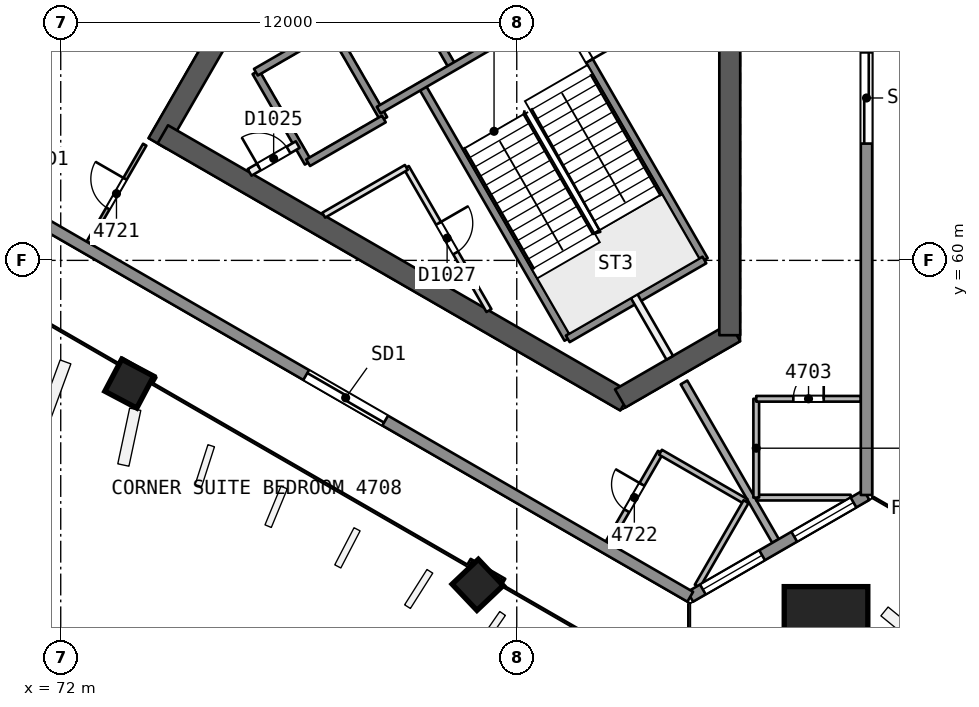
"""IFC4 building model, lengths in metres.
Left out: names, types, materials, properties, quantities, classifications, styles, units other than length and angle.
Written with IfcOpenShell. Run it as: python <this file> out.ifc"""

import sys

from ifc_helpers import new_model, si_unit, direction, frame, frame_2d, origin, origin_2d, place, context, subcontext, project, spatial, rectangle, extrude, element, fill, save


model = new_model("IFC4")
c1 = context("Model", 3, precision=1e-05, world=origin(), true_north=direction((0.0, 1.0)))
c2 = subcontext(c1, "Body", "Model", "MODEL_VIEW")
j1 = project(units=[si_unit("LENGTHUNIT", "METRE"), si_unit("PLANEANGLEUNIT", "RADIAN")], contexts=[c1])
p1 = place(None, origin())
s1 = spatial("IfcSite", under=j1, at=p1, CompositionType="ELEMENT")
p2 = place(p1, origin())
s2 = spatial("IfcBuilding", under=s1, at=p2, CompositionType="ELEMENT")
p3 = place(p2, frame((0.0, 0.0, 193.3)))
s3 = spatial("IfcBuildingStorey", under=s2, at=p3, CompositionType="ELEMENT", Elevation=193.3)
p4 = place(p3, frame((79.659, 71.931, 0.0), z_axis=(0.0, 0.0, 1.0), x_axis=(-0.500000202252, -0.866025287014, 0.0)))
e1 = element("IfcWall", 1, at=p4, inside=s3, PredefinedType="SHEAR", context=c2, shape_type="SweptSolid", body=[
    extrude(rectangle(XDim=10.221, YDim=0.55, at=frame_2d((5.111, 0.0))), origin(), (0.0, 0.0, 1.0), 3.7),
])
p5 = place(p4, frame((0.791, 0.0, 0.0)))
e2 = element("IfcOpeningElement", 2, at=p5, cuts=e1, PredefinedType="OPENING", context=c2, shape_type="SweptSolid", body=[
    extrude(rectangle(XDim=1.2, YDim=2.1, at=frame_2d((0.6, 1.05))), frame((0.0, 0.286, 0.0), z_axis=(0.0, -1.0, 0.0), x_axis=(1.0, 0.0, 0.0)), (0.0, 0.0, 1.0), 0.571),
])
p6 = place(p3, frame((74.686, 63.317, 0.0), z_axis=(0.0, 0.0, 1.0), x_axis=(0.866024505738, -0.500001555459, 0.0)))
e3 = element("IfcWall", 3, at=p6, inside=s3, PredefinedType="SHEAR", context=c2, shape_type="SweptSolid", body=[
    extrude(rectangle(XDim=14.059, YDim=0.55, at=frame_2d((7.029, 0.0))), origin(), (0.0, 0.0, 1.0), 3.7),
])
p7 = place(p3, frame((86.723, 56.367, 0.0), z_axis=(0.0, 0.0, 1.0), x_axis=(0.865997833373, 0.500047750313, 0.0)))
e4 = element("IfcWall", 4, at=p7, inside=s3, PredefinedType="SHEAR", context=c2, shape_type="SweptSolid", body=[
    extrude(rectangle(XDim=3.487, YDim=0.55, at=frame_2d((1.743, 0.0))), origin(), (0.0, 0.0, 1.0), 3.7),
])
p8 = place(p3, frame((89.605, 58.031, 0.0), z_axis=(0.0, 0.0, 1.0), x_axis=(0.0, 1.0, 0.0)))
e5 = element("IfcWall", 5, at=p8, inside=s3, PredefinedType="SHEAR", context=c2, shape_type="SweptSolid", body=[
    extrude(rectangle(XDim=14.175, YDim=0.55, at=frame_2d((7.087, 0.0))), origin(), (0.0, 0.0, 1.0), 3.7),
])
p9 = place(p3, frame((73.802, 56.728, 0.0), z_axis=(0.000857578916, 0.022824792675, 0.999739112668), x_axis=(-0.499949204908, -0.865819211891, 0.020196158824)))
e6 = element("IfcColumn", 6, at=p9, inside=s3, PredefinedType="COLUMN", context=c2, shape_type="SweptSolid", body=[
    extrude(rectangle(XDim=0.95, YDim=0.95, at=origin_2d()), origin(), (0.0, 0.0, 1.0), 3.701),
])
p10 = place(p3, frame((82.98, 51.429, 0.0), z_axis=(-0.008310502618, 0.028163369983, 0.999568787096), x_axis=(-0.502105222835, -0.864570935995, 0.020185188492)))
e7 = element("IfcColumn", 7, at=p10, inside=s3, PredefinedType="COLUMN", context=c2, shape_type="SweptSolid", body=[
    extrude(rectangle(XDim=0.95, YDim=0.95, at=origin_2d()), origin(), (0.0, 0.0, 1.0), 3.702),
])
p11 = place(p3, frame((92.159, 50.28, 0.0), z_axis=(-0.017607037296, 0.030466109479, 0.999380712447), x_axis=(-0.865809063816, -0.500374524745, 1.32655e-07)))
e8 = element("IfcColumn", 8, at=p11, inside=s3, PredefinedType="COLUMN", context=c2, shape_type="SweptSolid", body=[
    extrude(rectangle(XDim=2.2, YDim=2.2, at=origin_2d()), origin(), (0.0, 0.0, 1.0), 3.702),
])
p12 = place(p3, frame((92.786, 53.758, 0.0), z_axis=(0.0, 0.0, 1.0), x_axis=(-1.0, 0.0, 0.0)))
e9 = element("IfcWall", 9, at=p12, inside=s3, PredefinedType="PARTITIONING", context=c2, shape_type="SweptSolid", body=[
    extrude(rectangle(XDim=2.485, YDim=0.15, at=frame_2d((1.242, 0.0))), origin(), (0.0, 0.0, 1.0), 3.3),
])
p13 = place(p3, frame((90.302, 53.758, 0.0), z_axis=(0.0, 0.0, 1.0), x_axis=(0.0, 1.0, 0.0)))
e10 = element("IfcWall", 10, at=p13, inside=s3, PredefinedType="PARTITIONING", context=c2, shape_type="SweptSolid", body=[
    extrude(rectangle(XDim=2.6, YDim=0.15, at=frame_2d((1.3, 0.0))), origin(), (0.0, 0.0, 1.0), 3.3),
])
p14 = place(p3, frame((90.302, 56.358, 0.0), z_axis=(0.0, 0.0, 1.0), x_axis=(1.0, 0.0, 0.0)))
e11 = element("IfcWall", 11, at=p14, inside=s3, PredefinedType="PARTITIONING", context=c2, shape_type="SweptSolid", body=[
    extrude(rectangle(XDim=2.753, YDim=0.15, at=frame_2d((1.376, 0.0))), origin(), (0.0, 0.0, 1.0), 3.3),
])
p15 = place(p14, frame((0.976, 0.0, 0.0)))
e12 = element("IfcOpeningElement", 12, at=p15, cuts=e11, PredefinedType="OPENING", context=c2, shape_type="SweptSolid", body=[
    extrude(rectangle(XDim=0.8, YDim=2.1, at=frame_2d((0.4, 1.05))), frame((0.0, 0.085, 0.0), z_axis=(0.0, -1.0, 0.0), x_axis=(1.0, 0.0, 0.0)), (0.0, 0.0, 1.0), 0.171),
])
p16 = place(p3, frame((88.401, 56.789, 0.0), z_axis=(0.0, 0.0, 1.0), x_axis=(0.499971058166, -0.866042112715, 0.0)))
e13 = element("IfcWall", 13, at=p16, inside=s3, PredefinedType="PARTITIONING", context=c2, shape_type="SweptSolid", body=[
    extrude(rectangle(XDim=4.817, YDim=0.2, at=frame_2d((2.409, 0.0))), origin(), (0.0, 0.0, 1.0), 3.3),
])
p17 = place(p3, frame((68.673, 62.806, 0.0), z_axis=(0.0, 0.0, 1.0), x_axis=(0.499998338299, 0.866026363166, 0.0)))
e14 = element("IfcWall", 14, at=p17, inside=s3, PredefinedType="PARTITIONING", context=c2, shape_type="SweptSolid", body=[
    extrude(rectangle(XDim=10.954, YDim=0.2, at=frame_2d((5.477, 0.0))), origin(), (0.0, 0.0, 1.0), 3.3),
])
p18 = place(p3, frame((72.723, 60.468, 0.0), z_axis=(0.0, 0.0, 1.0), x_axis=(0.49997816789, 0.866038008192, 0.0)))
e15 = element("IfcWall", 15, at=p18, inside=s3, PredefinedType="PARTITIONING", context=c2, shape_type="SweptSolid", body=[
    extrude(rectangle(XDim=2.975, YDim=0.1, at=frame_2d((1.488, 0.0))), origin(), (0.0, 0.0, 1.0), 3.3),
])
p19 = place(p18, frame((1.038, 0.0, 0.0)))
e16 = element("IfcOpeningElement", 16, at=p19, cuts=e15, PredefinedType="OPENING", context=c2, shape_type="SweptSolid", body=[
    extrude(rectangle(XDim=0.9, YDim=2.1, at=frame_2d((0.45, 1.05))), frame((0.0, 0.061, 0.0), z_axis=(0.0, -1.0, 0.0), x_axis=(1.0, 0.0, 0.0)), (0.0, 0.0, 1.0), 0.121),
])
p20 = place(p3, frame((86.406, 52.568, 0.0), z_axis=(0.0, 0.0, 1.0), x_axis=(0.499983500429, 0.866034929606, 0.0)))
e17 = element("IfcWall", 17, at=p20, inside=s3, PredefinedType="PARTITIONING", context=c2, shape_type="SweptSolid", body=[
    extrude(rectangle(XDim=2.752, YDim=0.15, at=frame_2d((1.376, 0.0))), origin(), (0.0, 0.0, 1.0), 3.3),
])
p21 = place(p20, frame((0.976, 0.0, 0.0)))
e18 = element("IfcOpeningElement", 18, at=p21, cuts=e17, PredefinedType="OPENING", context=c2, shape_type="SweptSolid", body=[
    extrude(rectangle(XDim=0.8, YDim=2.1, at=frame_2d((0.4, 1.05))), frame((0.0, 0.085, 0.0), z_axis=(0.0, -1.0, 0.0), x_axis=(1.0, 0.0, 0.0)), (0.0, 0.0, 1.0), 0.171),
])
p22 = place(p3, frame((87.782, 54.951, 0.0), z_axis=(0.0, 0.0, 1.0), x_axis=(0.866021400173, -0.500006934395, 0.0)))
e19 = element("IfcWall", 19, at=p22, inside=s3, PredefinedType="PARTITIONING", context=c2, shape_type="SweptSolid", body=[
    extrude(rectangle(XDim=2.6, YDim=0.15, at=frame_2d((1.3, 0.0))), origin(), (0.0, 0.0, 1.0), 3.3),
])
p23 = place(p3, frame((90.034, 53.651, 0.0), z_axis=(0.0, 0.0, 1.0), x_axis=(-0.50000507078, -0.866022476149, 0.0)))
e20 = element("IfcWall", 20, at=p23, inside=s3, PredefinedType="PARTITIONING", context=c2, shape_type="SweptSolid", body=[
    extrude(rectangle(XDim=2.567, YDim=0.15, at=frame_2d((1.284, 0.0))), origin(), (0.0, 0.0, 1.0), 3.3),
])
p24 = place(p3, frame((93.203, 53.827, 0.0), z_axis=(0.0, 0.0, 1.0), x_axis=(-0.866023885066, -0.500002630489, 0.0)))
e21 = element("IfcWall", 21, at=p24, inside=s3, PredefinedType="SOLIDWALL", context=c2, shape_type="SweptSolid", body=[
    extrude(rectangle(XDim=5.355, YDim=0.3, at=frame_2d((2.678, 0.0))), origin(), (0.0, 0.0, 1.0), 3.3),
])
p25 = place(p24, frame((0.395, 0.0, 0.9)))
e22 = element("IfcOpeningElement", 22, at=p25, cuts=e21, PredefinedType="OPENING", context=c2, shape_type="SweptSolid", body=[
    extrude(rectangle(XDim=1.8, YDim=1.5, at=frame_2d((0.9, 0.75))), frame((0.0, 0.161, 0.0), z_axis=(0.0, -1.0, 0.0), x_axis=(1.0, 0.0, 0.0)), (0.0, 0.0, 1.0), 0.321),
])
p26 = place(p24, frame((3.172, 0.0, 0.9)))
e23 = element("IfcOpeningElement", 23, at=p26, cuts=e21, PredefinedType="OPENING", context=c2, shape_type="SweptSolid", body=[
    extrude(rectangle(XDim=1.8, YDim=1.5, at=frame_2d((0.9, 0.75))), frame((0.0, 0.161, 0.0), z_axis=(0.0, -1.0, 0.0), x_axis=(1.0, 0.0, 0.0)), (0.0, 0.0, 1.0), 0.321),
])
p27 = place(p3, frame((93.203, 106.173, 0.0), z_axis=(0.0, 0.0, 1.0), x_axis=(0.0, -1.0, 0.0)))
e24 = element("IfcWall", 24, at=p27, inside=s3, PredefinedType="SOLIDWALL", context=c2, shape_type="SweptSolid", body=[
    extrude(rectangle(XDim=52.347, YDim=0.3, at=frame_2d((26.173, 0.0))), origin(), (0.0, 0.0, 1.0), 3.3),
])
p28 = place(p27, frame((30.819, 0.0, 0.0)))
e25 = element("IfcOpeningElement", 25, at=p28, cuts=e24, PredefinedType="OPENING", context=c2, shape_type="SweptSolid", body=[
    extrude(rectangle(XDim=2.4, YDim=2.4, at=frame_2d((1.2, 1.2))), frame((0.0, 0.161, 0.0), z_axis=(0.0, -1.0, 0.0), x_axis=(1.0, 0.0, 0.0)), (0.0, 0.0, 1.0), 0.321),
])
p29 = place(p27, frame((40.7, 0.0, 0.0)))
e26 = element("IfcOpeningElement", 26, at=p29, cuts=e24, PredefinedType="OPENING", context=c2, shape_type="SweptSolid", body=[
    extrude(rectangle(XDim=2.4, YDim=2.4, at=frame_2d((1.2, 1.2))), frame((0.0, 0.161, 0.0), z_axis=(0.0, -1.0, 0.0), x_axis=(1.0, 0.0, 0.0)), (0.0, 0.0, 1.0), 0.321),
])
p30 = place(p27, frame((20.297, 0.0, 0.0)))
e27 = element("IfcOpeningElement", 27, at=p30, cuts=e24, PredefinedType="OPENING", context=c2, shape_type="SweptSolid", body=[
    extrude(rectangle(XDim=2.4, YDim=2.4, at=frame_2d((1.2, 1.2))), frame((0.0, 0.161, 0.0), z_axis=(0.0, -1.0, 0.0), x_axis=(1.0, 0.0, 0.0)), (0.0, 0.0, 1.0), 0.321),
])
p31 = place(p27, frame((9.27, 0.0, 0.0)))
e28 = element("IfcOpeningElement", 28, at=p31, cuts=e24, PredefinedType="OPENING", context=c2, shape_type="SweptSolid", body=[
    extrude(rectangle(XDim=2.4, YDim=2.4, at=frame_2d((1.2, 1.2))), frame((0.0, 0.161, 0.0), z_axis=(0.0, -1.0, 0.0), x_axis=(1.0, 0.0, 0.0)), (0.0, 0.0, 1.0), 0.321),
])
p32 = place(p27, frame((26.442, 0.0, 0.9)))
e29 = element("IfcOpeningElement", 29, at=p32, cuts=e24, PredefinedType="OPENING", context=c2, shape_type="SweptSolid", body=[
    extrude(rectangle(XDim=1.8, YDim=1.5, at=frame_2d((0.9, 0.75))), frame((0.0, 0.161, 0.0), z_axis=(0.0, -1.0, 0.0), x_axis=(1.0, 0.0, 0.0)), (0.0, 0.0, 1.0), 0.321),
])
p33 = place(p3, frame((88.565, 51.149, 0.0), z_axis=(0.0, 0.0, 1.0), x_axis=(-0.866025125259, 0.500000482419, 0.0)))
e30 = element("IfcWall", 30, at=p33, inside=s3, PredefinedType="SOLIDWALL", context=c2, shape_type="SweptSolid", body=[
    extrude(rectangle(XDim=52.347, YDim=0.3, at=frame_2d((26.173, 0.0))), origin(), (0.0, 0.0, 1.0), 3.3),
])
p34 = place(p33, frame((29.26, 0.0, 0.0)))
e31 = element("IfcOpeningElement", 31, at=p34, cuts=e30, PredefinedType="OPENING", context=c2, shape_type="SweptSolid", body=[
    extrude(rectangle(XDim=2.4, YDim=2.4, at=frame_2d((1.2, 1.2))), frame((0.0, 0.161, 0.0), z_axis=(0.0, -1.0, 0.0), x_axis=(1.0, 0.0, 0.0)), (0.0, 0.0, 1.0), 0.321),
])
p35 = place(p33, frame((40.7, 0.0, 0.0)))
e32 = element("IfcOpeningElement", 32, at=p35, cuts=e30, PredefinedType="OPENING", context=c2, shape_type="SweptSolid", body=[
    extrude(rectangle(XDim=2.4, YDim=2.4, at=frame_2d((1.2, 1.2))), frame((0.0, 0.161, 0.0), z_axis=(0.0, -1.0, 0.0), x_axis=(1.0, 0.0, 0.0)), (0.0, 0.0, 1.0), 0.321),
])
p36 = place(p33, frame((19.517, 0.0, 0.0)))
e33 = element("IfcOpeningElement", 33, at=p36, cuts=e30, PredefinedType="OPENING", context=c2, shape_type="SweptSolid", body=[
    extrude(rectangle(XDim=2.4, YDim=2.4, at=frame_2d((1.2, 1.2))), frame((0.0, 0.161, 0.0), z_axis=(0.0, -1.0, 0.0), x_axis=(1.0, 0.0, 0.0)), (0.0, 0.0, 1.0), 0.321),
])
p37 = place(p33, frame((9.27, 0.0, 0.0)))
e34 = element("IfcOpeningElement", 34, at=p37, cuts=e30, PredefinedType="OPENING", context=c2, shape_type="SweptSolid", body=[
    extrude(rectangle(XDim=2.4, YDim=2.4, at=frame_2d((1.2, 1.2))), frame((0.0, 0.161, 0.0), z_axis=(0.0, -1.0, 0.0), x_axis=(1.0, 0.0, 0.0)), (0.0, 0.0, 1.0), 0.321),
])
p38 = place(p33, frame((24.104, 0.0, 0.9)))
e35 = element("IfcOpeningElement", 35, at=p38, cuts=e30, PredefinedType="OPENING", context=c2, shape_type="SweptSolid", body=[
    extrude(rectangle(XDim=1.8, YDim=1.5, at=frame_2d((0.9, 0.75))), frame((0.0, 0.161, 0.0), z_axis=(0.0, -1.0, 0.0), x_axis=(1.0, 0.0, 0.0)), (0.0, 0.0, 1.0), 0.321),
])
p39 = place(p3, frame((77.135, 64.952, 0.0), z_axis=(0.0, 0.0, 1.0), x_axis=(0.499996545922, -0.866027397988, 0.0)))
e36 = element("IfcWall", 36, at=p39, inside=s3, PredefinedType="SOLIDWALL", context=c2, shape_type="SweptSolid", body=[
    extrude(rectangle(XDim=2.75, YDim=0.2, at=frame_2d((1.375, 0.0))), origin(), (0.0, 0.0, 1.0), 3.3),
])
p40 = place(p3, frame((81.094, 62.445, 0.0), z_axis=(0.0, 0.0, 1.0), x_axis=(0.499980071345, -0.866036909293, 0.0)))
e37 = element("IfcWall", 37, at=p40, inside=s3, PredefinedType="PARTITIONING", context=c2, shape_type="SweptSolid", body=[
    extrude(rectangle(XDim=4.348, YDim=0.15, at=frame_2d((2.174, 0.0))), origin(), (0.0, 0.0, 1.0), 3.3),
])
p41 = place(p40, frame((1.697, 0.0, 0.0)))
e38 = element("IfcOpeningElement", 38, at=p41, cuts=e37, PredefinedType="OPENING", context=c2, shape_type="SweptSolid", body=[
    extrude(rectangle(XDim=0.9, YDim=2.1, at=frame_2d((0.45, 1.05))), frame((0.0, 0.085, 0.0), z_axis=(0.0, -1.0, 0.0), x_axis=(1.0, 0.0, 0.0)), (0.0, 0.0, 1.0), 0.171),
])
p42 = place(p3, frame((79.127, 66.102, 0.0), z_axis=(0.0, 0.0, 1.0), x_axis=(0.499996545922, -0.866027397988, 0.0)))
e39 = element("IfcWall", 39, at=p42, inside=s3, PredefinedType="SOLIDWALL", context=c2, shape_type="SweptSolid", body=[
    extrude(rectangle(XDim=2.75, YDim=0.2, at=frame_2d((1.375, 0.0))), origin(), (0.0, 0.0, 1.0), 3.3),
])
p43 = place(p3, frame((81.493, 64.604, 0.0), z_axis=(0.0, 0.0, 1.0), x_axis=(0.500006057782, -0.866021906294, 0.0)))
e40 = element("IfcWall", 40, at=p43, inside=s3, PredefinedType="SOLIDWALL", context=c2, shape_type="SweptSolid", body=[
    extrude(rectangle(XDim=7.7, YDim=0.2, at=frame_2d((3.85, 0.0))), origin(), (0.0, 0.0, 1.0), 3.3),
])
p44 = place(p3, frame((81.076, 67.227, 0.0), z_axis=(0.0, 0.0, 1.0), x_axis=(0.50000366821, -0.866023285932, 0.0)))
e41 = element("IfcWall", 41, at=p44, inside=s3, PredefinedType="SOLIDWALL", context=c2, shape_type="SweptSolid", body=[
    extrude(rectangle(XDim=2.48, YDim=0.2, at=frame_2d((1.24, 0.0))), origin(), (0.0, 0.0, 1.0), 3.3),
])
p45 = place(p3, frame((87.09, 59.06, 0.0), z_axis=(0.0, 0.0, 1.0), x_axis=(0.499951854219, -0.86605319898, 0.0)))
e42 = element("IfcWall", 42, at=p45, inside=s3, PredefinedType="PARTITIONING", context=c2, shape_type="SweptSolid", body=[
    extrude(rectangle(XDim=1.873, YDim=0.2, at=frame_2d((0.937, 0.0))), origin(), (0.0, 0.0, 1.0), 3.3),
])
p46 = place(p3, frame((85.087, 66.679, 0.0), z_axis=(0.0, 0.0, 1.0), x_axis=(0.500019787375, -0.866013979237, 0.0)))
e43 = element("IfcWall", 43, at=p46, inside=s3, PredefinedType="SOLIDWALL", context=c2, shape_type="SweptSolid", body=[
    extrude(rectangle(XDim=7.7, YDim=0.2, at=frame_2d((3.85, 0.0))), origin(), (0.0, 0.0, 1.0), 3.3),
])
p47 = place(p46, frame((0.55, 0.0, 0.0)))
e44 = element("IfcOpeningElement", 44, at=p47, cuts=e43, PredefinedType="OPENING", context=c2, shape_type="SweptSolid", body=[
    extrude(rectangle(XDim=1.1, YDim=2.1, at=frame_2d((0.55, 1.05))), frame((0.0, 0.11, 0.0), z_axis=(0.0, -1.0, 0.0), x_axis=(1.0, 0.0, 0.0)), (0.0, 0.0, 1.0), 0.221),
])
p48 = place(p3, frame((77.135, 64.952, 0.0), z_axis=(0.0, 0.0, 1.0), x_axis=(0.866031916153, 0.499988720078, 0.0)))
e45 = element("IfcWall", 45, at=p48, inside=s3, PredefinedType="SOLIDWALL", context=c2, shape_type="SweptSolid", body=[
    extrude(rectangle(XDim=11.35, YDim=0.2, at=frame_2d((5.675, 0.0))), origin(), (0.0, 0.0, 1.0), 3.3),
])
p49 = place(p3, frame((76.97, 62.316, 0.0), z_axis=(0.0, 0.0, 1.0), x_axis=(0.865982457891, 0.500074377092, 0.0)))
e46 = element("IfcWall", 46, at=p49, inside=s3, PredefinedType="PARTITIONING", context=c2, shape_type="SweptSolid", body=[
    extrude(rectangle(XDim=1.461, YDim=0.2, at=frame_2d((0.73, 0.0))), origin(), (0.0, 0.0, 1.0), 3.3),
])
p50 = place(p49, frame((0.281, 0.0, 0.0)))
e47 = element("IfcOpeningElement", 47, at=p50, cuts=e46, PredefinedType="OPENING", context=c2, shape_type="SweptSolid", body=[
    extrude(rectangle(XDim=0.9, YDim=2.1, at=frame_2d((0.45, 1.05))), frame((0.0, 0.11, 0.0), z_axis=(0.0, -1.0, 0.0), x_axis=(1.0, 0.0, 0.0)), (0.0, 0.0, 1.0), 0.221),
])
p51 = place(p3, frame((80.367, 63.954, 0.0), z_axis=(0.0, 0.0, 1.0), x_axis=(0.866026575979, 0.499997969693, 0.0)))
e48 = element("IfcWall", 48, at=p51, inside=s3, PredefinedType="SOLIDWALL", context=c2, shape_type="SweptSolid", body=[
    extrude(rectangle(XDim=6.75, YDim=0.2, at=frame_2d((3.375, 0.0))), origin(), (0.0, 0.0, 1.0), 3.3),
])
p52 = place(p3, frame((78.51, 62.57, 0.0), z_axis=(0.0, 0.0, 1.0), x_axis=(0.866053019151, 0.499952165731, 0.0)))
e49 = element("IfcWall", 49, at=p52, inside=s3, PredefinedType="SOLIDWALL", context=c2, shape_type="SweptSolid", body=[
    extrude(rectangle(XDim=2.3, YDim=0.2, at=frame_2d((1.15, 0.0))), origin(), (0.0, 0.0, 1.0), 3.3),
])
p53 = place(p3, frame((78.92, 61.19, 0.0), z_axis=(0.0, 0.0, 1.0), x_axis=(0.866038211682, 0.499977815414, 0.0)))
e50 = element("IfcWall", 50, at=p53, inside=s3, PredefinedType="PARTITIONING", context=c2, shape_type="SweptSolid", body=[
    extrude(rectangle(XDim=2.51, YDim=0.15, at=frame_2d((1.255, 0.0))), origin(), (0.0, 0.0, 1.0), 3.3),
])
p54 = place(p3, frame((85.343, 57.935, 0.0), z_axis=(0.0, 0.0, 1.0), x_axis=(0.866004344652, 0.500036473714, 0.0)))
e51 = element("IfcWall", 51, at=p54, inside=s3, PredefinedType="SOLIDWALL", context=c2, shape_type="SweptSolid", body=[
    extrude(rectangle(XDim=4.15, YDim=0.2, at=frame_2d((2.075, 0.0))), origin(), (0.0, 0.0, 1.0), 3.3),
])
p55 = place(p15, origin())
e52 = element("IfcDoor", 52, at=p55, inside=s3, OperationType="SINGLE_SWING_RIGHT", PredefinedType="NOTDEFINED", context=c2, shape_type="SweptSolid", body=[
    extrude(rectangle(XDim=0.8, YDim=2.1, at=frame_2d((0.4, 1.05))), frame((0.0, 0.025, 0.0), z_axis=(0.0, -1.0, 0.0), x_axis=(1.0, 0.0, 0.0)), (0.0, 0.0, 1.0), 0.05),
])
fill(e12, e52)
p56 = place(p19, origin())
e53 = element("IfcDoor", 53, at=p56, inside=s3, OperationType="SINGLE_SWING_RIGHT", PredefinedType="NOTDEFINED", context=c2, shape_type="SweptSolid", body=[
    extrude(rectangle(XDim=0.9, YDim=2.1, at=frame_2d((0.45, 1.05))), frame((0.0, 0.025, 0.0), z_axis=(0.0, -1.0, 0.0), x_axis=(1.0, 0.0, 0.0)), (0.0, 0.0, 1.0), 0.05),
])
fill(e16, e53)
p57 = place(p21, origin())
e54 = element("IfcDoor", 54, at=p57, inside=s3, OperationType="SINGLE_SWING_RIGHT", PredefinedType="NOTDEFINED", context=c2, shape_type="SweptSolid", body=[
    extrude(rectangle(XDim=0.8, YDim=2.1, at=frame_2d((0.4, 1.05))), frame((0.0, 0.025, 0.0), z_axis=(0.0, -1.0, 0.0), x_axis=(1.0, 0.0, 0.0)), (0.0, 0.0, 1.0), 0.05),
])
fill(e18, e54)
p58 = place(p25, origin())
e55 = element("IfcWindow", 55, at=p58, inside=s3, PartitioningType="SINGLE_PANEL", PredefinedType="WINDOW", context=c2, shape_type="SweptSolid", body=[
    extrude(rectangle(XDim=1.8, YDim=1.5, at=frame_2d((0.9, 0.75))), frame((0.0, 0.03, 0.0), z_axis=(0.0, -1.0, 0.0), x_axis=(1.0, 0.0, 0.0)), (0.0, 0.0, 1.0), 0.06),
])
fill(e22, e55)
p59 = place(p26, origin())
e56 = element("IfcWindow", 56, at=p59, inside=s3, PartitioningType="SINGLE_PANEL", PredefinedType="WINDOW", context=c2, shape_type="SweptSolid", body=[
    extrude(rectangle(XDim=1.8, YDim=1.5, at=frame_2d((0.9, 0.75))), frame((0.0, 0.03, 0.0), z_axis=(0.0, -1.0, 0.0), x_axis=(1.0, 0.0, 0.0)), (0.0, 0.0, 1.0), 0.06),
])
fill(e23, e56)
p60 = place(p29, origin())
e57 = element("IfcDoor", 57, at=p60, inside=s3, OperationType="SLIDING_TO_RIGHT", PredefinedType="NOTDEFINED", context=c2, shape_type="SweptSolid", body=[
    extrude(rectangle(XDim=2.4, YDim=2.4, at=frame_2d((1.2, 1.2))), frame((0.0, 0.025, 0.0), z_axis=(0.0, -1.0, 0.0), x_axis=(1.0, 0.0, 0.0)), (0.0, 0.0, 1.0), 0.05),
])
fill(e26, e57)
p61 = place(p37, origin())
e58 = element("IfcDoor", 58, at=p61, inside=s3, OperationType="SLIDING_TO_RIGHT", PredefinedType="NOTDEFINED", context=c2, shape_type="SweptSolid", body=[
    extrude(rectangle(XDim=2.4, YDim=2.4, at=frame_2d((1.2, 1.2))), frame((0.0, 0.025, 0.0), z_axis=(0.0, -1.0, 0.0), x_axis=(1.0, 0.0, 0.0)), (0.0, 0.0, 1.0), 0.05),
])
fill(e34, e58)
p62 = place(p50, origin())
e59 = element("IfcDoor", 59, at=p62, inside=s3, OperationType="SINGLE_SWING_LEFT", PredefinedType="NOTDEFINED", context=c2, shape_type="SweptSolid", body=[
    extrude(rectangle(XDim=0.9, YDim=2.1, at=frame_2d((0.45, 1.05))), frame((0.0, 0.025, 0.0), z_axis=(0.0, -1.0, 0.0), x_axis=(1.0, 0.0, 0.0)), (0.0, 0.0, 1.0), 0.05),
])
fill(e47, e59)
p63 = place(p47, origin())
e60 = element("IfcDoor", 60, at=p63, inside=s3, OperationType="SINGLE_SWING_RIGHT", PredefinedType="NOTDEFINED", context=c2, shape_type="SweptSolid", body=[
    extrude(rectangle(XDim=1.1, YDim=2.1, at=frame_2d((0.55, 1.05))), frame((0.0, 0.025, 0.0), z_axis=(0.0, -1.0, 0.0), x_axis=(1.0, 0.0, 0.0)), (0.0, 0.0, 1.0), 0.05),
])
fill(e44, e60)
p64 = place(p41, origin())
e61 = element("IfcDoor", 61, at=p64, inside=s3, OperationType="SINGLE_SWING_LEFT", PredefinedType="NOTDEFINED", context=c2, shape_type="SweptSolid", body=[
    extrude(rectangle(XDim=0.9, YDim=2.1, at=frame_2d((0.45, 1.05))), frame((0.0, 0.025, 0.0), z_axis=(0.0, -1.0, 0.0), x_axis=(1.0, 0.0, 0.0)), (0.0, 0.0, 1.0), 0.05),
])
fill(e38, e61)
save(model, sys.argv[1])
